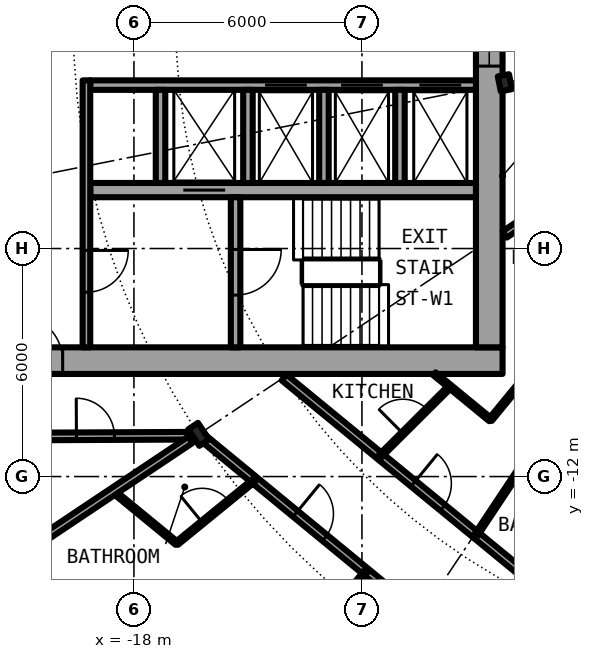
"""IFC4 building model, lengths in metres.
Left out: names, types, materials, properties, quantities, classifications, styles, units other than length and angle.
Written with IfcOpenShell. Run it as: python <this file> out.ifc"""

import sys

from ifc_helpers import new_model, si_unit, direction, frame, frame_2d, origin, origin_2d, place, context, subcontext, project, spatial, rectangle, i_section, extrude, element, fill, save


model = new_model("IFC4")
c1 = context("Model", 3, precision=1e-05, world=origin(), true_north=direction((0.0, 1.0)))
c2 = subcontext(c1, "Body", "Model", "MODEL_VIEW")
j1 = project(units=[si_unit("LENGTHUNIT", "METRE"), si_unit("PLANEANGLEUNIT", "RADIAN")], contexts=[c1])
p1 = place(None, origin())
s1 = spatial("IfcSite", under=j1, at=p1, CompositionType="ELEMENT")
p2 = place(p1, origin())
s2 = spatial("IfcBuilding", under=s1, at=p2, CompositionType="ELEMENT")
p3 = place(p2, frame((0.0, 0.0, 72.75)))
s3 = spatial("IfcBuildingStorey", under=s2, at=p3, CompositionType="ELEMENT", Elevation=72.75)
p4 = place(p3, frame((-16.297, -10.889, 0.0), z_axis=(0.0, 0.0, 1.0), x_axis=(-0.831469612303, -0.55557023302, 0.0)))
e1 = element("IfcColumn", 1, at=p4, inside=s3, PredefinedType="COLUMN", context=c2, shape_type="SweptSolid", body=[
    extrude(i_section(OverallWidth=0.306, OverallDepth=0.524, WebThickness=0.021, FlangeThickness=0.04, FilletRadius=0.027, at=origin_2d()), origin(), (0.0, 0.0, 1.0), 3.05),
])
p5 = place(p3, frame((-8.239, -1.639, 0.0), z_axis=(0.0, 0.0, 1.0), x_axis=(-0.980785280403, -0.195090322016, 0.0)))
e2 = element("IfcColumn", 2, at=p5, inside=s3, PredefinedType="COLUMN", context=c2, shape_type="SweptSolid", body=[
    extrude(i_section(OverallWidth=0.3, OverallDepth=0.4, WebThickness=0.013, FlangeThickness=0.024, FilletRadius=0.027, at=origin_2d()), origin(), (0.0, 0.0, 1.0), 3.05),
])
p6 = place(p3, frame((-22.3, -8.95, 0.0), z_axis=(0.0, 0.0, 1.0), x_axis=(1.0, 0.0, 0.0)))
e3 = element("IfcWall", 3, at=p6, inside=s3, PredefinedType="SHEAR", context=c2, shape_type="SweptSolid", body=[
    extrude(rectangle(XDim=14.0, YDim=0.7, at=frame_2d((7.0, 0.0))), origin(), (0.0, 0.0, 1.0), 3.05),
])
p7 = place(p6, frame((1.225, 0.0, 0.0)))
e4 = element("IfcOpeningElement", 4, at=p7, cuts=e3, PredefinedType="OPENING", context=c2, shape_type="SweptSolid", body=[
    extrude(rectangle(XDim=1.2, YDim=2.3, at=frame_2d((0.6, 1.15))), frame((0.0, 0.36, 0.0), z_axis=(0.0, -1.0, 0.0), x_axis=(1.0, 0.0, 0.0)), (0.0, 0.0, 1.0), 0.72),
])
p8 = place(p3, frame((-8.65, 8.6, 0.0), z_axis=(0.0, 0.0, 1.0), x_axis=(0.0, -1.0, 0.0)))
e5 = element("IfcWall", 5, at=p8, inside=s3, PredefinedType="SHEAR", context=c2, shape_type="SweptSolid", body=[
    extrude(rectangle(XDim=17.2, YDim=0.7, at=frame_2d((8.6, 0.0))), origin(), (0.0, 0.0, 1.0), 3.05),
])
p9 = place(p8, frame((7.4, 0.0, 0.1)))
e6 = element("IfcOpeningElement", 6, at=p9, cuts=e5, PredefinedType="OPENING", context=c2, shape_type="SweptSolid", body=[
    extrude(rectangle(XDim=2.4, YDim=2.2, at=frame_2d((1.2, 1.1))), frame((0.0, 0.36, 0.0), z_axis=(0.0, -1.0, 0.0), x_axis=(1.0, 0.0, 0.0)), (0.0, 0.0, 1.0), 0.72),
])
p10 = place(p3, frame((-9.0, -1.7, 0.0), z_axis=(0.0, 0.0, 1.0), x_axis=(-1.0, 0.0, 0.0)))
e7 = element("IfcWall", 7, at=p10, inside=s3, PredefinedType="SHEAR", context=c2, shape_type="SweptSolid", body=[
    extrude(rectangle(XDim=10.15, YDim=0.25, at=frame_2d((5.075, 0.0))), origin(), (0.0, 0.0, 1.0), 3.05),
])
p11 = place(p10, frame((0.387, 0.0, 0.0)))
e8 = element("IfcOpeningElement", 8, at=p11, cuts=e7, PredefinedType="OPENING", context=c2, shape_type="SweptSolid", body=[
    extrude(rectangle(XDim=1.1, YDim=2.3, at=frame_2d((0.55, 1.15))), frame((0.0, 0.135, 0.0), z_axis=(0.0, -1.0, 0.0), x_axis=(1.0, 0.0, 0.0)), (0.0, 0.0, 1.0), 0.27),
])
p12 = place(p10, frame((2.45, 0.0, 0.0)))
e9 = element("IfcOpeningElement", 9, at=p12, cuts=e7, PredefinedType="OPENING", context=c2, shape_type="SweptSolid", body=[
    extrude(rectangle(XDim=1.1, YDim=2.3, at=frame_2d((0.55, 1.15))), frame((0.0, 0.135, 0.0), z_axis=(0.0, -1.0, 0.0), x_axis=(1.0, 0.0, 0.0)), (0.0, 0.0, 1.0), 0.27),
])
p13 = place(p10, frame((4.45, 0.0, 0.0)))
e10 = element("IfcOpeningElement", 10, at=p13, cuts=e7, PredefinedType="OPENING", context=c2, shape_type="SweptSolid", body=[
    extrude(rectangle(XDim=1.1, YDim=2.3, at=frame_2d((0.55, 1.15))), frame((0.0, 0.135, 0.0), z_axis=(0.0, -1.0, 0.0), x_axis=(1.0, 0.0, 0.0)), (0.0, 0.0, 1.0), 0.27),
])
p14 = place(p3, frame((-9.0, -4.462, 0.0), z_axis=(0.0, 0.0, 1.0), x_axis=(-1.0, 0.0, 0.0)))
e11 = element("IfcWall", 11, at=p14, inside=s3, PredefinedType="SHEAR", context=c2, shape_type="SweptSolid", body=[
    extrude(rectangle(XDim=10.15, YDim=0.375, at=frame_2d((5.075, 0.0))), origin(), (0.0, 0.0, 1.0), 3.05),
])
p15 = place(p14, frame((6.6, 0.0, 0.0)))
e12 = element("IfcOpeningElement", 12, at=p15, cuts=e11, PredefinedType="OPENING", context=c2, shape_type="SweptSolid", body=[
    extrude(rectangle(XDim=1.1, YDim=2.3, at=frame_2d((0.55, 1.15))), frame((0.0, 0.198, 0.0), z_axis=(0.0, -1.0, 0.0), x_axis=(1.0, 0.0, 0.0)), (0.0, 0.0, 1.0), 0.395),
])
p16 = place(p3, frame((-15.325, -4.65, 0.0), z_axis=(0.0, 0.0, 1.0), x_axis=(0.0, -1.0, 0.0)))
e13 = element("IfcWall", 13, at=p16, inside=s3, PredefinedType="SHEAR", context=c2, shape_type="SweptSolid", body=[
    extrude(rectangle(XDim=3.95, YDim=0.25, at=frame_2d((1.975, 0.0))), origin(), (0.0, 0.0, 1.0), 3.05),
])
p17 = place(p16, frame((1.375, 0.0, 0.0)))
e14 = element("IfcOpeningElement", 14, at=p17, cuts=e13, PredefinedType="OPENING", context=c2, shape_type="SweptSolid", body=[
    extrude(rectangle(XDim=1.2, YDim=2.3, at=frame_2d((0.6, 1.15))), frame((0.0, 0.135, 0.0), z_axis=(0.0, -1.0, 0.0), x_axis=(1.0, 0.0, 0.0)), (0.0, 0.0, 1.0), 0.27),
])
for number, where, z_axis, x_axis in (
    (15, (-15.0, -1.825, 0.0), (0.0, 0.0, 1.0), (0.0, -1.0, 0.0)),
    (16, (-17.3, -1.825, 0.0), (0.0, 0.0, 1.0), (0.0, -1.0, 0.0)),
):
    element("IfcWall", number, at=place(p3, frame(where, z_axis=z_axis, x_axis=x_axis)), inside=s3, PredefinedType="SOLIDWALL", context=c2, shape_type="SweptSolid", body=[
        extrude(rectangle(XDim=2.45, YDim=0.25, at=frame_2d((1.225, 0.0))), origin(), (0.0, 0.0, 1.0), 2.7),
    ])
p18 = place(p3, frame((-19.25, -1.575, 0.0), z_axis=(0.0, 0.0, 1.0), x_axis=(0.0, -1.0, 0.0)))
e17 = element("IfcWall", 17, at=p18, inside=s3, PredefinedType="SOLIDWALL", context=c2, shape_type="SweptSolid", body=[
    extrude(rectangle(XDim=7.025, YDim=0.2, at=frame_2d((3.513, 0.0))), origin(), (0.0, 0.0, 1.0), 2.7),
])
p19 = place(p18, frame((4.475, 0.0, 0.0)))
e18 = element("IfcOpeningElement", 18, at=p19, cuts=e17, PredefinedType="OPENING", context=c2, shape_type="SweptSolid", body=[
    extrude(rectangle(XDim=1.1, YDim=2.3, at=frame_2d((0.55, 1.15))), frame((0.0, 0.11, 0.0), z_axis=(0.0, -1.0, 0.0), x_axis=(1.0, 0.0, 0.0)), (0.0, 0.0, 1.0), 0.22),
])
for number, where, z_axis, x_axis in (
    (19, (-11.0, -1.825, 0.0), (0.0, 0.0, 1.0), (0.0, -1.0, 0.0)),
    (20, (-13.0, -1.825, 0.0), (0.0, 0.0, 1.0), (0.0, -1.0, 0.0)),
):
    element("IfcWall", number, at=place(p3, frame(where, z_axis=z_axis, x_axis=x_axis)), inside=s3, PredefinedType="SOLIDWALL", context=c2, shape_type="SweptSolid", body=[
        extrude(rectangle(XDim=2.45, YDim=0.25, at=frame_2d((1.225, 0.0))), origin(), (0.0, 0.0, 1.0), 2.7),
    ])
p20 = place(p3, frame((-18.542, -12.389, 0.0), z_axis=(0.0, 0.0, 1.0), x_axis=(0.772948171844, -0.634469166818, 0.0)))
e21 = element("IfcWall", 21, at=p20, inside=s3, PredefinedType="PARTITIONING", context=c2, shape_type="SweptSolid", body=[
    extrude(rectangle(XDim=2.158, YDim=0.1, at=frame_2d((1.079, 0.0))), origin(), (0.0, 0.0, 1.0), 2.7),
])
p21 = place(p3, frame((-16.172, -10.99, 0.0), z_axis=(0.0, 0.0, 1.0), x_axis=(0.772669779479, -0.634808169355, 0.0)))
e22 = element("IfcWall", 22, at=p21, inside=s3, PredefinedType="PARTITIONING", context=c2, shape_type="SweptSolid", body=[
    extrude(rectangle(XDim=11.208, YDim=0.2, at=frame_2d((5.604, 0.0))), origin(), (0.0, 0.0, 1.0), 2.38),
])
p22 = place(p21, frame((3.135, 0.0, 0.0)))
e23 = element("IfcOpeningElement", 23, at=p22, cuts=e22, PredefinedType="OPENING", context=c2, shape_type="SweptSolid", body=[
    extrude(rectangle(XDim=1.0, YDim=2.3, at=frame_2d((0.5, 1.15))), frame((0.0, 0.11, 0.0), z_axis=(0.0, -1.0, 0.0), x_axis=(1.0, 0.0, 0.0)), (0.0, 0.0, 1.0), 0.22),
])
p23 = place(p3, frame((-14.05, -9.392, 0.0), z_axis=(0.0, 0.0, 1.0), x_axis=(0.773074935257, -0.634314704605, 0.0)))
e24 = element("IfcWall", 24, at=p23, inside=s3, PredefinedType="PARTITIONING", context=c2, shape_type="SweptSolid", body=[
    extrude(rectangle(XDim=9.809, YDim=0.2, at=frame_2d((4.904, 0.0))), origin(), (0.0, 0.0, 1.0), 2.7),
])
p24 = place(p23, frame((4.402, 0.0, 0.0)))
e25 = element("IfcOpeningElement", 25, at=p24, cuts=e24, PredefinedType="OPENING", context=c2, shape_type="SweptSolid", body=[
    extrude(rectangle(XDim=1.0, YDim=2.3, at=frame_2d((0.5, 1.15))), frame((0.0, 0.11, 0.0), z_axis=(0.0, -1.0, 0.0), x_axis=(1.0, 0.0, 0.0)), (0.0, 0.0, 1.0), 0.22),
])
p25 = place(p3, frame((-10.093, -9.296, 0.0), z_axis=(0.0, 0.0, 1.0), x_axis=(0.772957368531, -0.6344579627, 0.0)))
e26 = element("IfcWall", 26, at=p25, inside=s3, PredefinedType="PARTITIONING", context=c2, shape_type="SweptSolid", body=[
    extrude(rectangle(XDim=1.906, YDim=0.1, at=frame_2d((0.953, 0.0))), origin(), (0.0, 0.0, 1.0), 2.7),
])
p26 = place(p3, frame((-21.675, -10.95, 0.0), z_axis=(0.0, 0.0, 1.0), x_axis=(0.999988944514, 0.004702217579, 0.0)))
e27 = element("IfcWall", 27, at=p26, inside=s3, PredefinedType="PARTITIONING", context=c2, shape_type="SweptSolid", body=[
    extrude(rectangle(XDim=5.088, YDim=0.2, at=frame_2d((2.544, 0.0))), origin(), (0.0, 0.0, 1.0), 2.7),
])
p27 = place(p26, frame((2.162, 0.0, 0.0)))
e28 = element("IfcOpeningElement", 28, at=p27, cuts=e27, PredefinedType="OPENING", context=c2, shape_type="SweptSolid", body=[
    extrude(rectangle(XDim=1.0, YDim=2.3, at=frame_2d((0.5, 1.15))), frame((0.0, 0.11, 0.0), z_axis=(0.0, -1.0, 0.0), x_axis=(1.0, 0.0, 0.0)), (0.0, 0.0, 1.0), 0.22),
])
p28 = place(p3, frame((-6.513, -4.472, 0.0), z_axis=(0.0, 0.0, 1.0), x_axis=(-0.831382204863, -0.555701025225, 0.0)))
e29 = element("IfcWall", 29, at=p28, inside=s3, PredefinedType="PARTITIONING", context=c2, shape_type="SweptSolid", body=[
    extrude(rectangle(XDim=2.082, YDim=0.2, at=frame_2d((1.041, 0.0))), origin(), (0.0, 0.0, 1.0), 2.7),
])
p29 = place(p3, frame((-22.595, -15.097, 0.0), z_axis=(0.0, 0.0, 1.0), x_axis=(0.831505405283, 0.555516661303, 0.0)))
e30 = element("IfcWall", 30, at=p29, inside=s3, PredefinedType="PARTITIONING", context=c2, shape_type="SweptSolid", body=[
    extrude(rectangle(XDim=7.312, YDim=0.2, at=frame_2d((3.656, 0.0))), origin(), (0.0, 0.0, 1.0), 2.7),
])
p30 = place(p3, frame((-17.24, -21.007, 0.0), z_axis=(0.0, 0.0, 1.0), x_axis=(0.634396151441, 0.77300810024, 0.0)))
e31 = element("IfcWall", 31, at=p30, inside=s3, PredefinedType="PARTITIONING", context=c2, shape_type="SweptSolid", body=[
    extrude(rectangle(XDim=8.419, YDim=0.1, at=frame_2d((4.209, 0.0))), origin(), (0.0, 0.0, 1.0), 2.7),
])
p31 = place(p30, frame((6.679, 0.0, 0.0)))
e32 = element("IfcOpeningElement", 32, at=p31, cuts=e31, PredefinedType="OPENING", context=c2, shape_type="SweptSolid", body=[
    extrude(rectangle(XDim=0.9, YDim=2.3, at=frame_2d((0.45, 1.15))), frame((0.0, 0.06, 0.0), z_axis=(0.0, -1.0, 0.0), x_axis=(1.0, 0.0, 0.0)), (0.0, 0.0, 1.0), 0.12),
])
p32 = place(p30, frame((2.468, 0.0, 0.0)))
e33 = element("IfcOpeningElement", 33, at=p32, cuts=e31, PredefinedType="OPENING", context=c2, shape_type="SweptSolid", body=[
    extrude(rectangle(XDim=0.9, YDim=2.3, at=frame_2d((0.45, 1.15))), frame((0.0, 0.06, 0.0), z_axis=(0.0, -1.0, 0.0), x_axis=(1.0, 0.0, 0.0)), (0.0, 0.0, 1.0), 0.12),
])
p33 = place(p3, frame((-16.874, -13.758, 0.0), z_axis=(0.0, 0.0, 1.0), x_axis=(0.774979608522, 0.631986239072, 0.0)))
e34 = element("IfcWall", 34, at=p33, inside=s3, PredefinedType="PARTITIONING", context=c2, shape_type="SweptSolid", body=[
    extrude(rectangle(XDim=2.636, YDim=0.1, at=frame_2d((1.318, 0.0))), origin(), (0.0, 0.0, 1.0), 2.7),
])
p34 = place(p33, frame((0.868, 0.0, 0.0)))
e35 = element("IfcOpeningElement", 35, at=p34, cuts=e34, PredefinedType="OPENING", context=c2, shape_type="SweptSolid", body=[
    extrude(rectangle(XDim=0.9, YDim=2.3, at=frame_2d((0.45, 1.15))), frame((0.0, 0.06, 0.0), z_axis=(0.0, -1.0, 0.0), x_axis=(1.0, 0.0, 0.0)), (0.0, 0.0, 1.0), 0.12),
])
p35 = place(p3, frame((-11.524, -11.464, 0.0), z_axis=(0.0, 0.0, 1.0), x_axis=(0.708796844581, 0.705412668665, 0.0)))
e36 = element("IfcWall", 36, at=p35, inside=s3, PredefinedType="PARTITIONING", context=c2, shape_type="SweptSolid", body=[
    extrude(rectangle(XDim=2.597, YDim=0.1, at=frame_2d((1.299, 0.0))), origin(), (0.0, 0.0, 1.0), 2.7),
])
p36 = place(p35, frame((0.849, 0.0, 0.0)))
e37 = element("IfcOpeningElement", 37, at=p36, cuts=e36, PredefinedType="OPENING", context=c2, shape_type="SweptSolid", body=[
    extrude(rectangle(XDim=0.9, YDim=2.3, at=frame_2d((0.45, 1.15))), frame((0.0, 0.06, 0.0), z_axis=(0.0, -1.0, 0.0), x_axis=(1.0, 0.0, 0.0)), (0.0, 0.0, 1.0), 0.12),
])
p37 = place(p3, frame((-8.996, -13.539, 0.0), z_axis=(0.0, 0.0, 1.0), x_axis=(0.553615197403, 0.83277260594, 0.0)))
e38 = element("IfcWall", 38, at=p37, inside=s3, PredefinedType="PARTITIONING", context=c2, shape_type="SweptSolid", body=[
    extrude(rectangle(XDim=2.597, YDim=0.1, at=frame_2d((1.299, 0.0))), origin(), (0.0, 0.0, 1.0), 2.7),
])
p38 = place(p3, frame((-8.62, -10.504, 0.0), z_axis=(0.0, 0.0, 1.0), x_axis=(0.634539754242, 0.772890225249, 0.0)))
e39 = element("IfcWall", 39, at=p38, inside=s3, PredefinedType="PARTITIONING", context=c2, shape_type="SweptSolid", body=[
    extrude(rectangle(XDim=5.867, YDim=0.1, at=frame_2d((2.934, 0.0))), origin(), (0.0, 0.0, 1.0), 2.7),
])
p39 = place(p38, frame((2.484, 0.0, 0.0)))
e40 = element("IfcOpeningElement", 40, at=p39, cuts=e39, PredefinedType="OPENING", context=c2, shape_type="SweptSolid", body=[
    extrude(rectangle(XDim=0.9, YDim=2.3, at=frame_2d((0.45, 1.15))), frame((0.0, 0.06, 0.0), z_axis=(0.0, -1.0, 0.0), x_axis=(1.0, 0.0, 0.0)), (0.0, 0.0, 1.0), 0.12),
])
p40 = place(p11, origin())
e41 = element("IfcDoor", 41, at=p40, inside=s3, OperationType="DOUBLE_DOOR_SLIDING", PredefinedType="DOOR", context=c2, shape_type="SweptSolid", body=[
    extrude(rectangle(XDim=1.1, YDim=2.3, at=frame_2d((0.55, 1.15))), frame((0.0, 0.025, 0.0), z_axis=(0.0, -1.0, 0.0), x_axis=(1.0, 0.0, 0.0)), (0.0, 0.0, 1.0), 0.05),
])
fill(e8, e41)
p41 = place(p12, origin())
e42 = element("IfcDoor", 42, at=p41, inside=s3, OperationType="DOUBLE_DOOR_SLIDING", PredefinedType="DOOR", context=c2, shape_type="SweptSolid", body=[
    extrude(rectangle(XDim=1.1, YDim=2.3, at=frame_2d((0.55, 1.15))), frame((0.0, 0.025, 0.0), z_axis=(0.0, -1.0, 0.0), x_axis=(1.0, 0.0, 0.0)), (0.0, 0.0, 1.0), 0.05),
])
fill(e9, e42)
p42 = place(p13, origin())
e43 = element("IfcDoor", 43, at=p42, inside=s3, OperationType="DOUBLE_DOOR_SLIDING", PredefinedType="DOOR", context=c2, shape_type="SweptSolid", body=[
    extrude(rectangle(XDim=1.1, YDim=2.3, at=frame_2d((0.55, 1.15))), frame((0.0, 0.025, 0.0), z_axis=(0.0, -1.0, 0.0), x_axis=(1.0, 0.0, 0.0)), (0.0, 0.0, 1.0), 0.05),
])
fill(e10, e43)
p43 = place(p15, origin())
e44 = element("IfcDoor", 44, at=p43, inside=s3, OperationType="DOUBLE_DOOR_SLIDING", PredefinedType="DOOR", context=c2, shape_type="SweptSolid", body=[
    extrude(rectangle(XDim=1.1, YDim=2.3, at=frame_2d((0.55, 1.15))), frame((0.0, 0.025, 0.0), z_axis=(0.0, -1.0, 0.0), x_axis=(1.0, 0.0, 0.0)), (0.0, 0.0, 1.0), 0.05),
])
fill(e12, e44)
p44 = place(p17, origin())
e45 = element("IfcDoor", 45, at=p44, inside=s3, OperationType="SINGLE_SWING_LEFT", PredefinedType="DOOR", context=c2, shape_type="SweptSolid", body=[
    extrude(rectangle(XDim=1.2, YDim=2.3, at=frame_2d((0.6, 1.15))), frame((0.0, 0.025, 0.0), z_axis=(0.0, -1.0, 0.0), x_axis=(1.0, 0.0, 0.0)), (0.0, 0.0, 1.0), 0.05),
])
fill(e14, e45)
p45 = place(p19, origin())
e46 = element("IfcDoor", 46, at=p45, inside=s3, OperationType="SINGLE_SWING_LEFT", PredefinedType="DOOR", context=c2, shape_type="SweptSolid", body=[
    extrude(rectangle(XDim=1.1, YDim=2.3, at=frame_2d((0.55, 1.15))), frame((0.0, 0.025, 0.0), z_axis=(0.0, -1.0, 0.0), x_axis=(1.0, 0.0, 0.0)), (0.0, 0.0, 1.0), 0.05),
])
fill(e18, e46)
p46 = place(p7, origin())
e47 = element("IfcDoor", 47, at=p46, inside=s3, OperationType="SINGLE_SWING_RIGHT", PredefinedType="DOOR", context=c2, shape_type="SweptSolid", body=[
    extrude(rectangle(XDim=1.2, YDim=2.3, at=frame_2d((0.6, 1.15))), frame((0.0, 0.025, 0.0), z_axis=(0.0, -1.0, 0.0), x_axis=(1.0, 0.0, 0.0)), (0.0, 0.0, 1.0), 0.05),
])
fill(e4, e47)
p47 = place(p9, origin())
e48 = element("IfcWindow", 48, at=p47, inside=s3, PartitioningType="SINGLE_PANEL", PredefinedType="WINDOW", context=c2, shape_type="SweptSolid", body=[
    extrude(rectangle(XDim=2.4, YDim=2.2, at=frame_2d((1.2, 1.1))), frame((0.0, 0.03, 0.0), z_axis=(0.0, -1.0, 0.0), x_axis=(1.0, 0.0, 0.0)), (0.0, 0.0, 1.0), 0.06),
])
fill(e6, e48)
p48 = place(p22, origin())
e49 = element("IfcDoor", 49, at=p48, inside=s3, OperationType="SINGLE_SWING_LEFT", PredefinedType="DOOR", context=c2, shape_type="SweptSolid", body=[
    extrude(rectangle(XDim=1.0, YDim=2.3, at=frame_2d((0.5, 1.15))), frame((0.0, 0.025, 0.0), z_axis=(0.0, -1.0, 0.0), x_axis=(1.0, 0.0, 0.0)), (0.0, 0.0, 1.0), 0.05),
])
fill(e23, e49)
p49 = place(p34, origin())
e50 = element("IfcDoor", 50, at=p49, inside=s3, OperationType="SINGLE_SWING_LEFT", PredefinedType="DOOR", context=c2, shape_type="SweptSolid", body=[
    extrude(rectangle(XDim=0.9, YDim=2.3, at=frame_2d((0.45, 1.15))), frame((0.0, 0.025, 0.0), z_axis=(0.0, -1.0, 0.0), x_axis=(1.0, 0.0, 0.0)), (0.0, 0.0, 1.0), 0.05),
])
fill(e35, e50)
p50 = place(p24, origin())
e51 = element("IfcDoor", 51, at=p50, inside=s3, OperationType="SINGLE_SWING_LEFT", PredefinedType="DOOR", context=c2, shape_type="SweptSolid", body=[
    extrude(rectangle(XDim=1.0, YDim=2.3, at=frame_2d((0.5, 1.15))), frame((0.0, 0.025, 0.0), z_axis=(0.0, -1.0, 0.0), x_axis=(1.0, 0.0, 0.0)), (0.0, 0.0, 1.0), 0.05),
])
fill(e25, e51)
p51 = place(p36, origin())
e52 = element("IfcDoor", 52, at=p51, inside=s3, OperationType="SINGLE_SWING_RIGHT", PredefinedType="DOOR", context=c2, shape_type="SweptSolid", body=[
    extrude(rectangle(XDim=0.9, YDim=2.3, at=frame_2d((0.45, 1.15))), frame((0.0, 0.025, 0.0), z_axis=(0.0, -1.0, 0.0), x_axis=(1.0, 0.0, 0.0)), (0.0, 0.0, 1.0), 0.05),
])
fill(e37, e52)
p52 = place(p27, origin())
e53 = element("IfcDoor", 53, at=p52, inside=s3, OperationType="SINGLE_SWING_RIGHT", PredefinedType="DOOR", context=c2, shape_type="SweptSolid", body=[
    extrude(rectangle(XDim=1.0, YDim=2.3, at=frame_2d((0.5, 1.15))), frame((0.0, 0.025, 0.0), z_axis=(0.0, -1.0, 0.0), x_axis=(1.0, 0.0, 0.0)), (0.0, 0.0, 1.0), 0.05),
])
fill(e28, e53)
save(model, sys.argv[1])
